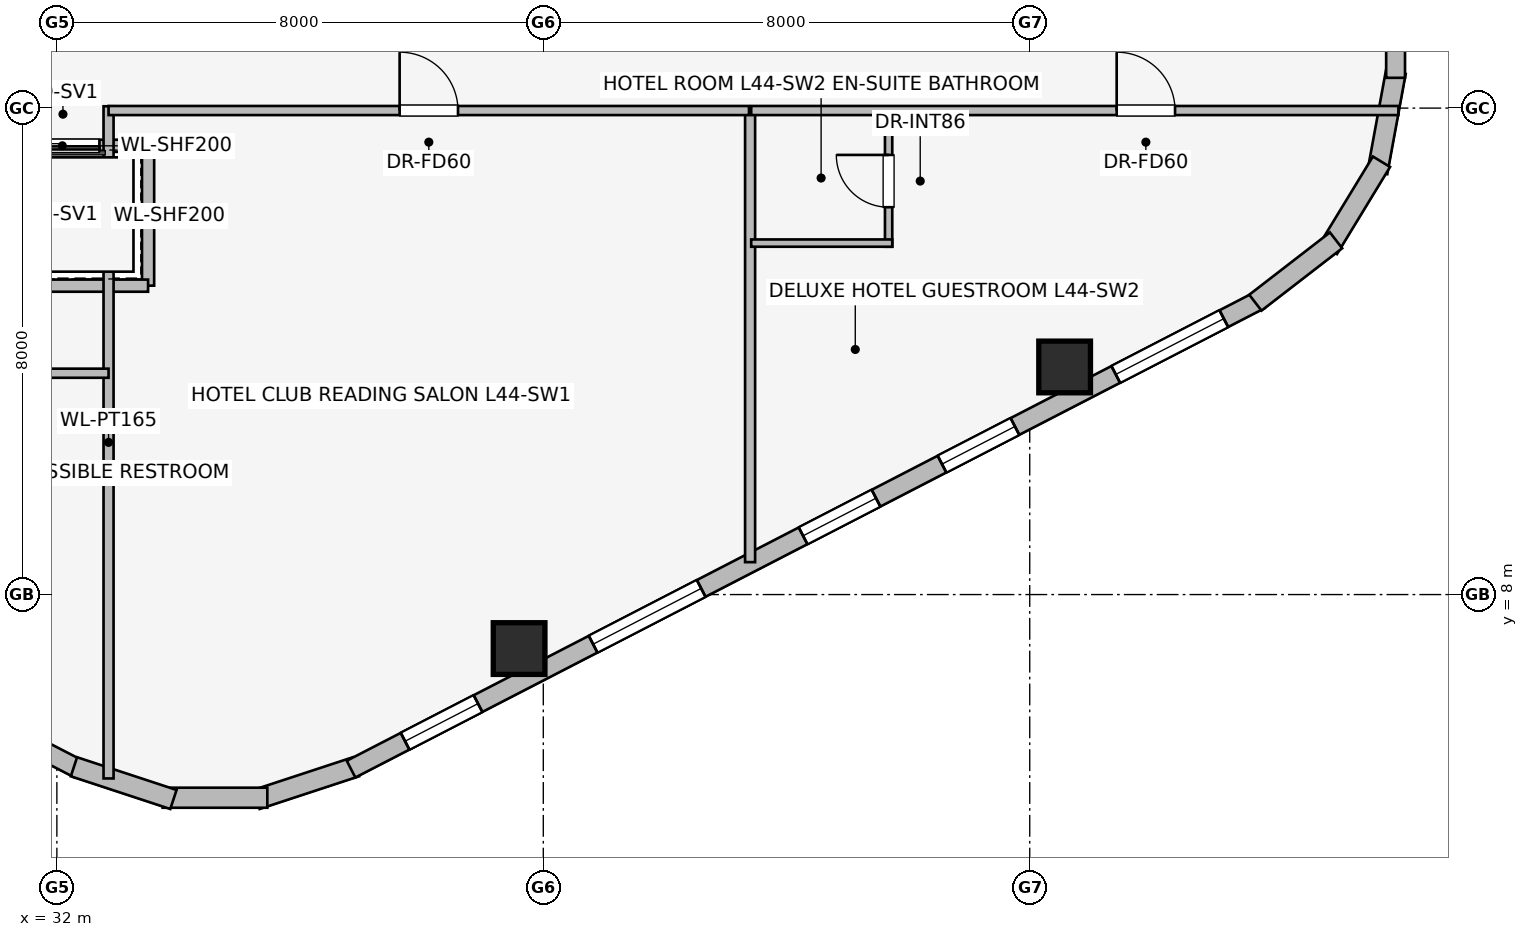
"""IFC4 building model, lengths in metres.
Left out: names, types, materials, properties, quantities, classifications, styles, units other than length and angle.
Written with IfcOpenShell. Run it as: python <this file> out.ifc"""

import sys

from ifc_helpers import new_model, si_unit, direction, frame, frame_2d, origin, origin_2d, place, context, subcontext, project, spatial, rectangle, extrude, element, fill, save


model = new_model("IFC4")
c1 = context("Model", 3, precision=1e-05, world=origin(), true_north=direction((0.0, 1.0)))
c2 = subcontext(c1, "Body", "Model", "MODEL_VIEW")
j1 = project(units=[si_unit("LENGTHUNIT", "METRE"), si_unit("PLANEANGLEUNIT", "RADIAN")], contexts=[c1])
p1 = place(None, origin())
s1 = spatial("IfcSite", under=j1, at=p1, CompositionType="ELEMENT")
p2 = place(p1, origin())
s2 = spatial("IfcBuilding", under=s1, at=p2, CompositionType="ELEMENT")
p3 = place(p2, frame((0.0, 0.0, 163.65)))
s3 = spatial("IfcBuildingStorey", under=s2, at=p3, CompositionType="ELEMENT", Elevation=163.65)
for number, where, z_axis, x_axis in (
    (1, (39.602, 7.112, 0.0), (0.0, 0.0, 1.0), (1.0, 0.0, 0.0)),
    (2, (48.574, 11.743, 0.0), (0.0, 0.0, 1.0), (1.0, 0.0, 0.0)),
):
    element("IfcColumn", number, at=place(p3, frame(where, z_axis=z_axis, x_axis=x_axis)), inside=s3, PredefinedType="COLUMN", context=c2, shape_type="SweptSolid", body=[
        extrude(rectangle(XDim=0.85, YDim=0.85, at=origin_2d()), origin(), (0.0, 0.0, 1.0), 3.45),
    ])
p4 = place(p3, frame((32.362, 5.129, 0.0), z_axis=(0.0, 0.0, 1.0), x_axis=(-0.888626188278, 0.458632202867, 0.0)))
e3 = element("IfcWall", 3, at=p4, inside=s3, PredefinedType="STANDARD", context=c2, shape_type="SweptSolid", body=[
    extrude(rectangle(XDim=16.828, YDim=0.31, at=frame_2d((8.414, 0.0))), origin(), (0.0, 0.0, 1.0), 3.19),
])
p5 = place(p4, frame((1.137, 0.0, 0.75)))
e4 = element("IfcOpeningElement", 4, at=p5, cuts=e3, PredefinedType="OPENING", context=c2, shape_type="SweptSolid", body=[
    extrude(rectangle(XDim=1.05, YDim=1.4, at=frame_2d((0.525, 0.7))), frame((0.0, 0.165, 0.0), z_axis=(0.0, -1.0, 0.0), x_axis=(1.0, 0.0, 0.0)), (0.0, 0.0, 1.0), 0.33),
])
p6 = place(p4, frame((4.768, 0.0, 0.75)))
e5 = element("IfcOpeningElement", 5, at=p6, cuts=e3, PredefinedType="OPENING", context=c2, shape_type="SweptSolid", body=[
    extrude(rectangle(XDim=1.35, YDim=1.45, at=frame_2d((0.675, 0.725))), frame((0.0, 0.165, 0.0), z_axis=(0.0, -1.0, 0.0), x_axis=(1.0, 0.0, 0.0)), (0.0, 0.0, 1.0), 0.33),
])
p7 = place(p4, frame((7.739, 0.0, 0.75)))
e6 = element("IfcOpeningElement", 6, at=p7, cuts=e3, PredefinedType="OPENING", context=c2, shape_type="SweptSolid", body=[
    extrude(rectangle(XDim=1.35, YDim=1.45, at=frame_2d((0.675, 0.725))), frame((0.0, 0.165, 0.0), z_axis=(0.0, -1.0, 0.0), x_axis=(1.0, 0.0, 0.0)), (0.0, 0.0, 1.0), 0.33),
])
p8 = place(p4, frame((10.71, 0.0, 0.75)))
e7 = element("IfcOpeningElement", 7, at=p8, cuts=e3, PredefinedType="OPENING", context=c2, shape_type="SweptSolid", body=[
    extrude(rectangle(XDim=1.35, YDim=1.45, at=frame_2d((0.675, 0.725))), frame((0.0, 0.165, 0.0), z_axis=(0.0, -1.0, 0.0), x_axis=(1.0, 0.0, 0.0)), (0.0, 0.0, 1.0), 0.33),
])
p9 = place(p4, frame((14.885, 0.0, 0.75)))
e8 = element("IfcOpeningElement", 8, at=p9, cuts=e3, PredefinedType="OPENING", context=c2, shape_type="SweptSolid", body=[
    extrude(rectangle(XDim=1.05, YDim=1.4, at=frame_2d((0.525, 0.7))), frame((0.0, 0.165, 0.0), z_axis=(0.0, -1.0, 0.0), x_axis=(1.0, 0.0, 0.0)), (0.0, 0.0, 1.0), 0.33),
])
p10 = place(p3, frame((36.919, 5.168, 0.0), z_axis=(0.0, 0.0, 1.0), x_axis=(-0.949937416267, -0.312440242569, 0.0)))
e9 = element("IfcWall", 9, at=p10, inside=s3, PredefinedType="STANDARD", context=c2, shape_type="SweptSolid", body=[
    extrude(rectangle(XDim=1.722, YDim=0.33, at=frame_2d((0.861, 0.0))), origin(), (0.0, 0.0, 1.0), 3.19),
])
p11 = place(p3, frame((35.461, 4.659, 0.0), z_axis=(0.0, 0.0, 1.0), x_axis=(-1.0, 0.0, 0.0)))
e10 = element("IfcWall", 10, at=p11, inside=s3, PredefinedType="STANDARD", context=c2, shape_type="SweptSolid", body=[
    extrude(rectangle(XDim=1.722, YDim=0.33, at=frame_2d((0.861, 0.0))), origin(), (0.0, 0.0, 1.0), 3.19),
])
p12 = place(p3, frame((33.917, 4.63, 0.0), z_axis=(0.0, 0.0, 1.0), x_axis=(-0.949937416267, 0.312440242569, 0.0)))
e11 = element("IfcWall", 11, at=p12, inside=s3, PredefinedType="STANDARD", context=c2, shape_type="SweptSolid", body=[
    extrude(rectangle(XDim=1.722, YDim=0.33, at=frame_2d((0.861, 0.0))), origin(), (0.0, 0.0, 1.0), 3.19),
])
p13 = place(p3, frame((51.792, 12.847, 0.0), z_axis=(0.0, 0.0, 1.0), x_axis=(-0.888626188278, -0.458632202867, 0.0)))
e12 = element("IfcWall", 12, at=p13, inside=s3, PredefinedType="STANDARD", context=c2, shape_type="SweptSolid", body=[
    extrude(rectangle(XDim=16.828, YDim=0.31, at=frame_2d((8.414, 0.0))), origin(), (0.0, 0.0, 1.0), 3.19),
])
p14 = place(p13, frame((0.675, 0.0, 0.75)))
e13 = element("IfcOpeningElement", 13, at=p14, cuts=e12, PredefinedType="OPENING", context=c2, shape_type="SweptSolid", body=[
    extrude(rectangle(XDim=2.0, YDim=1.5, at=frame_2d((1.0, 0.75))), frame((0.0, 0.165, 0.0), z_axis=(0.0, -1.0, 0.0), x_axis=(1.0, 0.0, 0.0)), (0.0, 0.0, 1.0), 0.33),
])
p15 = place(p13, frame((4.541, 0.0, 0.75)))
e14 = element("IfcOpeningElement", 14, at=p15, cuts=e12, PredefinedType="OPENING", context=c2, shape_type="SweptSolid", body=[
    extrude(rectangle(XDim=1.35, YDim=1.45, at=frame_2d((0.675, 0.725))), frame((0.0, 0.165, 0.0), z_axis=(0.0, -1.0, 0.0), x_axis=(1.0, 0.0, 0.0)), (0.0, 0.0, 1.0), 0.33),
])
p16 = place(p13, frame((7.112, 0.0, 0.75)))
e15 = element("IfcOpeningElement", 15, at=p16, cuts=e12, PredefinedType="OPENING", context=c2, shape_type="SweptSolid", body=[
    extrude(rectangle(XDim=1.35, YDim=1.45, at=frame_2d((0.675, 0.725))), frame((0.0, 0.165, 0.0), z_axis=(0.0, -1.0, 0.0), x_axis=(1.0, 0.0, 0.0)), (0.0, 0.0, 1.0), 0.33),
])
p17 = place(p13, frame((10.348, 0.0, 0.75)))
e16 = element("IfcOpeningElement", 16, at=p17, cuts=e12, PredefinedType="OPENING", context=c2, shape_type="SweptSolid", body=[
    extrude(rectangle(XDim=2.0, YDim=1.5, at=frame_2d((1.0, 0.75))), frame((0.0, 0.165, 0.0), z_axis=(0.0, -1.0, 0.0), x_axis=(1.0, 0.0, 0.0)), (0.0, 0.0, 1.0), 0.33),
])
p18 = place(p13, frame((14.478, 0.0, 0.75)))
e17 = element("IfcOpeningElement", 17, at=p18, cuts=e12, PredefinedType="OPENING", context=c2, shape_type="SweptSolid", body=[
    extrude(rectangle(XDim=1.35, YDim=1.45, at=frame_2d((0.675, 0.725))), frame((0.0, 0.165, 0.0), z_axis=(0.0, -1.0, 0.0), x_axis=(1.0, 0.0, 0.0)), (0.0, 0.0, 1.0), 0.33),
])
p19 = place(p3, frame((54.021, 16.592, 0.0), z_axis=(0.0, 0.0, 1.0), x_axis=(-0.180717642671, -0.983535019014, 0.0)))
e18 = element("IfcWall", 18, at=p19, inside=s3, PredefinedType="STANDARD", context=c2, shape_type="SweptSolid", body=[
    extrude(rectangle(XDim=1.677, YDim=0.33, at=frame_2d((0.838, 0.0))), origin(), (0.0, 0.0, 1.0), 3.19),
])
p20 = place(p3, frame((53.785, 15.118, 0.0), z_axis=(0.0, 0.0, 1.0), x_axis=(-0.520219286058, -0.85403272444, 0.0)))
e19 = element("IfcWall", 19, at=p20, inside=s3, PredefinedType="STANDARD", context=c2, shape_type="SweptSolid", body=[
    extrude(rectangle(XDim=1.678, YDim=0.33, at=frame_2d((0.839, 0.0))), origin(), (0.0, 0.0, 1.0), 3.19),
])
p21 = place(p3, frame((53.038, 13.825, 0.0), z_axis=(0.0, 0.0, 1.0), x_axis=(-0.791464279355, -0.611215423976, 0.0)))
e20 = element("IfcWall", 20, at=p21, inside=s3, PredefinedType="STANDARD", context=c2, shape_type="SweptSolid", body=[
    extrude(rectangle(XDim=1.677, YDim=0.33, at=frame_2d((0.838, 0.0))), origin(), (0.0, 0.0, 1.0), 3.19),
])
p22 = place(p3, frame((54.017, 31.502, 0.0), z_axis=(0.0, 0.0, 1.0), x_axis=(0.0, -1.0, 0.0)))
e21 = element("IfcWall", 21, at=p22, inside=s3, PredefinedType="STANDARD", context=c2, shape_type="SweptSolid", body=[
    extrude(rectangle(XDim=15.004, YDim=0.31, at=frame_2d((7.502, 0.0))), origin(), (0.0, 0.0, 1.0), 3.19),
])
p23 = place(p22, frame((4.353, 0.0, 0.75)))
e22 = element("IfcOpeningElement", 22, at=p23, cuts=e21, PredefinedType="OPENING", context=c2, shape_type="SweptSolid", body=[
    extrude(rectangle(XDim=2.0, YDim=1.5, at=frame_2d((1.0, 0.75))), frame((0.0, 0.165, 0.0), z_axis=(0.0, -1.0, 0.0), x_axis=(1.0, 0.0, 0.0)), (0.0, 0.0, 1.0), 0.33),
])
p24 = place(p22, frame((8.083, 0.0, 0.75)))
e23 = element("IfcOpeningElement", 23, at=p24, cuts=e21, PredefinedType="OPENING", context=c2, shape_type="SweptSolid", body=[
    extrude(rectangle(XDim=1.35, YDim=1.45, at=frame_2d((0.675, 0.725))), frame((0.0, 0.165, 0.0), z_axis=(0.0, -1.0, 0.0), x_axis=(1.0, 0.0, 0.0)), (0.0, 0.0, 1.0), 0.33),
])
p25 = place(p22, frame((9.87, 0.0, 0.75)))
e24 = element("IfcOpeningElement", 24, at=p25, cuts=e21, PredefinedType="OPENING", context=c2, shape_type="SweptSolid", body=[
    extrude(rectangle(XDim=1.35, YDim=1.45, at=frame_2d((0.675, 0.725))), frame((0.0, 0.165, 0.0), z_axis=(0.0, -1.0, 0.0), x_axis=(1.0, 0.0, 0.0)), (0.0, 0.0, 1.0), 0.33),
])
p26 = place(p3, frame((33.5, 15.38, 0.0), z_axis=(0.0, 0.0, 1.0), x_axis=(-1.0, 0.0, 0.0)))
e25 = element("IfcWall", 25, at=p26, inside=s3, PredefinedType="PARTITIONING", context=c2, shape_type="SweptSolid", body=[
    extrude(rectangle(XDim=2.82, YDim=0.2, at=frame_2d((1.41, 0.0))), origin(), (0.0, 0.0, 1.0), 3.19),
])
p27 = place(p26, frame((0.8, 0.0, 0.0)))
e26 = element("IfcOpeningElement", 26, at=p27, cuts=e25, PredefinedType="OPENING", context=c2, shape_type="SweptSolid", body=[
    extrude(rectangle(XDim=1.2, YDim=2.2, at=frame_2d((0.6, 1.1))), frame((0.0, 0.11, 0.0), z_axis=(0.0, -1.0, 0.0), x_axis=(1.0, 0.0, 0.0)), (0.0, 0.0, 1.0), 0.22),
])
p28 = place(p3, frame((33.5, 13.08, 0.0), z_axis=(0.0, 0.0, 1.0), x_axis=(0.0, 1.0, 0.0)))
e27 = element("IfcWall", 27, at=p28, inside=s3, PredefinedType="PARTITIONING", context=c2, shape_type="SweptSolid", body=[
    extrude(rectangle(XDim=2.3, YDim=0.2, at=frame_2d((1.15, 0.0))), origin(), (0.0, 0.0, 1.0), 3.19),
])
p29 = place(p3, frame((30.879, 13.08, 0.0), z_axis=(0.0, 0.0, 1.0), x_axis=(1.0, 0.0, 0.0)))
e28 = element("IfcWall", 28, at=p29, inside=s3, PredefinedType="PARTITIONING", context=c2, shape_type="SweptSolid", body=[
    extrude(rectangle(XDim=2.621, YDim=0.2, at=frame_2d((1.311, 0.0))), origin(), (0.0, 0.0, 1.0), 3.19),
])
p30 = place(p3, frame((32.85, 4.976, 0.0), z_axis=(0.0, 0.0, 1.0), x_axis=(0.0, 1.0, 0.0)))
e29 = element("IfcWall", 29, at=p30, inside=s3, PredefinedType="PARTITIONING", context=c2, shape_type="SweptSolid", body=[
    extrude(rectangle(XDim=11.054, YDim=0.165, at=frame_2d((5.527, 0.0))), origin(), (0.0, 0.0, 1.0), 3.19),
])
p31 = place(p3, frame((19.757, 11.64, 0.0), z_axis=(0.0, 0.0, 1.0), x_axis=(1.0, 0.0, 0.0)))
e30 = element("IfcWall", 30, at=p31, inside=s3, PredefinedType="PARTITIONING", context=c2, shape_type="SweptSolid", body=[
    extrude(rectangle(XDim=13.093, YDim=0.15, at=frame_2d((6.546, 0.0))), origin(), (0.0, 0.0, 1.0), 3.19),
])
p32 = place(p31, frame((3.243, 0.0, 0.0)))
e31 = element("IfcOpeningElement", 31, at=p32, cuts=e30, PredefinedType="OPENING", context=c2, shape_type="SweptSolid", body=[
    extrude(rectangle(XDim=0.9, YDim=2.0, at=frame_2d((0.45, 1.0))), frame((0.0, 0.085, 0.0), z_axis=(0.0, -1.0, 0.0), x_axis=(1.0, 0.0, 0.0)), (0.0, 0.0, 1.0), 0.17),
])
p33 = place(p3, frame((43.401, 8.533, 0.0), z_axis=(0.0, 0.0, 1.0), x_axis=(0.0, 1.0, 0.0)))
e32 = element("IfcWall", 32, at=p33, inside=s3, PredefinedType="PARTITIONING", context=c2, shape_type="SweptSolid", body=[
    extrude(rectangle(XDim=7.397, YDim=0.165, at=frame_2d((3.698, 0.0))), origin(), (0.0, 0.0, 1.0), 3.19),
])
p34 = place(p3, frame((32.85, 15.96, 0.0), z_axis=(0.0, 0.0, 1.0), x_axis=(1.0, 0.0, 0.0)))
e33 = element("IfcWall", 33, at=p34, inside=s3, PredefinedType="PARTITIONING", context=c2, shape_type="SweptSolid", body=[
    extrude(rectangle(XDim=10.533, YDim=0.15, at=frame_2d((5.267, 0.0))), origin(), (0.0, 0.0, 1.0), 3.19),
])
p35 = place(p34, frame((4.787, 0.0, 0.0)))
e34 = element("IfcOpeningElement", 34, at=p35, cuts=e33, PredefinedType="OPENING", context=c2, shape_type="SweptSolid", body=[
    extrude(rectangle(XDim=0.96, YDim=2.0, at=frame_2d((0.48, 1.0))), frame((0.0, 0.085, 0.0), z_axis=(0.0, -1.0, 0.0), x_axis=(1.0, 0.0, 0.0)), (0.0, 0.0, 1.0), 0.17),
])
p36 = place(p3, frame((45.679, 13.72, 0.0), z_axis=(0.0, 0.0, 1.0), x_axis=(0.0, 1.0, 0.0)))
e35 = element("IfcWall", 35, at=p36, inside=s3, PredefinedType="PARTITIONING", context=c2, shape_type="SweptSolid", body=[
    extrude(rectangle(XDim=2.24, YDim=0.12, at=frame_2d((1.12, 0.0))), origin(), (0.0, 0.0, 1.0), 3.19),
])
p37 = place(p36, frame((0.65, 0.0, 0.0)))
e36 = element("IfcOpeningElement", 36, at=p37, cuts=e35, PredefinedType="OPENING", context=c2, shape_type="SweptSolid", body=[
    extrude(rectangle(XDim=0.86, YDim=2.0, at=frame_2d((0.43, 1.0))), frame((0.0, 0.07, 0.0), z_axis=(0.0, -1.0, 0.0), x_axis=(1.0, 0.0, 0.0)), (0.0, 0.0, 1.0), 0.14),
])
p38 = place(p3, frame((43.419, 13.78, 0.0), z_axis=(0.0, 0.0, 1.0), x_axis=(1.0, 0.0, 0.0)))
e37 = element("IfcWall", 37, at=p38, inside=s3, PredefinedType="PARTITIONING", context=c2, shape_type="SweptSolid", body=[
    extrude(rectangle(XDim=2.32, YDim=0.12, at=frame_2d((1.16, 0.0))), origin(), (0.0, 0.0, 1.0), 3.19),
])
p39 = place(p3, frame((43.419, 15.96, 0.0), z_axis=(0.0, 0.0, 1.0), x_axis=(1.0, 0.0, 0.0)))
e38 = element("IfcWall", 38, at=p39, inside=s3, PredefinedType="PARTITIONING", context=c2, shape_type="SweptSolid", body=[
    extrude(rectangle(XDim=10.644, YDim=0.15, at=frame_2d((5.322, 0.0))), origin(), (0.0, 0.0, 1.0), 3.19),
])
p40 = place(p39, frame((6.011, 0.0, 0.0)))
e39 = element("IfcOpeningElement", 39, at=p40, cuts=e38, PredefinedType="OPENING", context=c2, shape_type="SweptSolid", body=[
    extrude(rectangle(XDim=0.96, YDim=2.0, at=frame_2d((0.48, 1.0))), frame((0.0, 0.085, 0.0), z_axis=(0.0, -1.0, 0.0), x_axis=(1.0, 0.0, 0.0)), (0.0, 0.0, 1.0), 0.17),
])
p41 = place(p14, origin())
e40 = element("IfcWindow", 40, at=p41, inside=s3, PartitioningType="SINGLE_PANEL", PredefinedType="WINDOW", context=c2, shape_type="SweptSolid", body=[
    extrude(rectangle(XDim=2.0, YDim=1.5, at=frame_2d((1.0, 0.75))), frame((0.0, 0.03, 0.0), z_axis=(0.0, -1.0, 0.0), x_axis=(1.0, 0.0, 0.0)), (0.0, 0.0, 1.0), 0.06),
])
fill(e13, e40)
p42 = place(p15, origin())
e41 = element("IfcWindow", 41, at=p42, inside=s3, PartitioningType="SINGLE_PANEL", PredefinedType="WINDOW", context=c2, shape_type="SweptSolid", body=[
    extrude(rectangle(XDim=1.35, YDim=1.45, at=frame_2d((0.675, 0.725))), frame((0.0, 0.03, 0.0), z_axis=(0.0, -1.0, 0.0), x_axis=(1.0, 0.0, 0.0)), (0.0, 0.0, 1.0), 0.06),
])
fill(e14, e41)
p43 = place(p16, origin())
e42 = element("IfcWindow", 42, at=p43, inside=s3, PartitioningType="SINGLE_PANEL", PredefinedType="WINDOW", context=c2, shape_type="SweptSolid", body=[
    extrude(rectangle(XDim=1.35, YDim=1.45, at=frame_2d((0.675, 0.725))), frame((0.0, 0.03, 0.0), z_axis=(0.0, -1.0, 0.0), x_axis=(1.0, 0.0, 0.0)), (0.0, 0.0, 1.0), 0.06),
])
fill(e15, e42)
p44 = place(p17, origin())
e43 = element("IfcWindow", 43, at=p44, inside=s3, PartitioningType="SINGLE_PANEL", PredefinedType="WINDOW", context=c2, shape_type="SweptSolid", body=[
    extrude(rectangle(XDim=2.0, YDim=1.5, at=frame_2d((1.0, 0.75))), frame((0.0, 0.03, 0.0), z_axis=(0.0, -1.0, 0.0), x_axis=(1.0, 0.0, 0.0)), (0.0, 0.0, 1.0), 0.06),
])
fill(e16, e43)
p45 = place(p18, origin())
e44 = element("IfcWindow", 44, at=p45, inside=s3, PartitioningType="SINGLE_PANEL", PredefinedType="WINDOW", context=c2, shape_type="SweptSolid", body=[
    extrude(rectangle(XDim=1.35, YDim=1.45, at=frame_2d((0.675, 0.725))), frame((0.0, 0.03, 0.0), z_axis=(0.0, -1.0, 0.0), x_axis=(1.0, 0.0, 0.0)), (0.0, 0.0, 1.0), 0.06),
])
fill(e17, e44)
p46 = place(p27, origin())
e45 = element("IfcDoor", 45, at=p46, inside=s3, OperationType="SLIDING_TO_RIGHT", PredefinedType="DOOR", context=c2, shape_type="SweptSolid", body=[
    extrude(rectangle(XDim=1.2, YDim=2.2, at=frame_2d((0.6, 1.1))), frame((0.0, 0.025, 0.0), z_axis=(0.0, -1.0, 0.0), x_axis=(1.0, 0.0, 0.0)), (0.0, 0.0, 1.0), 0.05),
])
fill(e26, e45)
p47 = place(p35, origin())
e46 = element("IfcDoor", 46, at=p47, inside=s3, OperationType="SINGLE_SWING_LEFT", PredefinedType="DOOR", context=c2, shape_type="SweptSolid", body=[
    extrude(rectangle(XDim=0.96, YDim=2.0, at=frame_2d((0.48, 1.0))), frame((0.0, 0.025, 0.0), z_axis=(0.0, -1.0, 0.0), x_axis=(1.0, 0.0, 0.0)), (0.0, 0.0, 1.0), 0.05),
])
fill(e34, e46)
p48 = place(p37, origin())
e47 = element("IfcDoor", 47, at=p48, inside=s3, OperationType="SINGLE_SWING_RIGHT", PredefinedType="DOOR", context=c2, shape_type="SweptSolid", body=[
    extrude(rectangle(XDim=0.86, YDim=2.0, at=frame_2d((0.43, 1.0))), frame((0.0, 0.025, 0.0), z_axis=(0.0, -1.0, 0.0), x_axis=(1.0, 0.0, 0.0)), (0.0, 0.0, 1.0), 0.05),
])
fill(e36, e47)
p49 = place(p40, origin())
e48 = element("IfcDoor", 48, at=p49, inside=s3, OperationType="SINGLE_SWING_LEFT", PredefinedType="DOOR", context=c2, shape_type="SweptSolid", body=[
    extrude(rectangle(XDim=0.96, YDim=2.0, at=frame_2d((0.48, 1.0))), frame((0.0, 0.025, 0.0), z_axis=(0.0, -1.0, 0.0), x_axis=(1.0, 0.0, 0.0)), (0.0, 0.0, 1.0), 0.05),
])
fill(e39, e48)
save(model, sys.argv[1])
